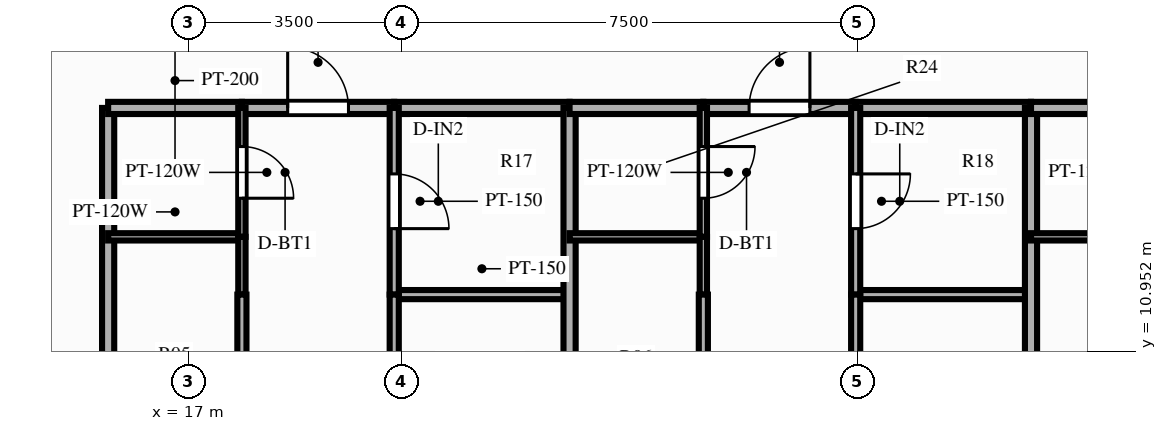
"""IFC4 building model, lengths in metres.
Left out: names, types, materials, properties, quantities, classifications, styles, units other than length and angle.
Written with IfcOpenShell. Run it as: python <this file> out.ifc"""

import sys

from ifc_helpers import new_model, si_unit, direction, frame, frame_2d, origin, place, context, subcontext, project, spatial, rectangle, extrude, source, transform, mapped, element, fill, save


model = new_model("IFC4")
c1 = context("Model", 3, precision=1e-05, world=origin(), true_north=direction((0.0, 1.0)))
c2 = subcontext(c1, "Body", "Model", "MODEL_VIEW")
j1 = project(units=[si_unit("LENGTHUNIT", "METRE"), si_unit("PLANEANGLEUNIT", "RADIAN")], contexts=[c1])
p1 = place(None, origin())
s1 = spatial("IfcSite", under=j1, at=p1, CompositionType="ELEMENT")
p2 = place(p1, origin())
s2 = spatial("IfcBuilding", under=s1, at=p2, CompositionType="ELEMENT")
p3 = place(p2, frame((0.0, 0.0, 22.4)))
s3 = spatial("IfcBuildingStorey", under=s2, at=p3, CompositionType="ELEMENT", Elevation=22.4)
p4 = place(p3, frame((15.68, 14.95, 0.0), z_axis=(0.0, 0.0, 1.0), x_axis=(0.0, -1.0, 0.0)))
e1 = element("IfcWall", 1, at=p4, inside=s3, PredefinedType="PARTITIONING", context=c2, shape_type="SweptSolid", body=[
    extrude(rectangle(XDim=11.8, YDim=0.2, at=frame_2d((5.9, 0.0))), origin(), (0.0, 0.0, 1.0), 2.79),
])
p5 = place(p3, frame((15.68, 14.95, 0.0), z_axis=(0.0, 0.0, 1.0), x_axis=(1.0, 0.0, 0.0)))
e2 = element("IfcWall", 2, at=p5, inside=s3, PredefinedType="PARTITIONING", context=c2, shape_type="SweptSolid", body=[
    extrude(rectangle(XDim=2.2, YDim=0.2, at=frame_2d((1.1, 0.0))), origin(), (0.0, 0.0, 1.0), 2.79),
])
p6 = place(p3, frame((17.88, 14.95, 0.0), z_axis=(0.0, 0.0, 1.0), x_axis=(1.0, 0.0, 0.0)))
e3 = element("IfcWall", 3, at=p6, inside=s3, PredefinedType="PARTITIONING", context=c2, shape_type="SweptSolid", body=[
    extrude(rectangle(XDim=2.505, YDim=0.2, at=frame_2d((1.252, 0.0))), origin(), (0.0, 0.0, 1.0), 2.79),
])
p7 = place(p6, frame((0.753, 0.0, 0.0)))
e4 = element("IfcOpeningElement", 4, at=p7, cuts=e3, PredefinedType="OPENING", context=c2, shape_type="SweptSolid", body=[
    extrude(rectangle(XDim=1.0, YDim=2.15, at=frame_2d((0.5, 1.075))), frame((0.0, 0.112, 0.0), z_axis=(0.0, -1.0, 0.0), x_axis=(1.0, 0.0, 0.0)), (0.0, 0.0, 1.0), 0.224),
])
p8 = place(p3, frame((20.385, 14.95, 0.0), z_axis=(0.0, 0.0, 1.0), x_axis=(1.0, 0.0, 0.0)))
e5 = element("IfcWall", 5, at=p8, inside=s3, PredefinedType="PARTITIONING", context=c2, shape_type="SweptSolid", body=[
    extrude(rectangle(XDim=2.884, YDim=0.2, at=frame_2d((1.442, 0.0))), origin(), (0.0, 0.0, 1.0), 2.79),
])
p9 = place(p3, frame((15.68, 12.83, 0.0), z_axis=(0.0, 0.0, 1.0), x_axis=(1.0, 0.0, 0.0)))
e6 = element("IfcWall", 6, at=p9, inside=s3, PredefinedType="PARTITIONING", context=c2, shape_type="SweptSolid", body=[
    extrude(rectangle(XDim=2.2, YDim=0.12, at=frame_2d((1.1, 0.0))), origin(), (0.0, 0.0, 1.0), 2.79),
])
p10 = place(p3, frame((20.385, 11.88, 0.0), z_axis=(0.0, 0.0, 1.0), x_axis=(1.0, 0.0, 0.0)))
e7 = element("IfcWall", 7, at=p10, inside=s3, PredefinedType="PARTITIONING", context=c2, shape_type="SweptSolid", body=[
    extrude(rectangle(XDim=2.884, YDim=0.15, at=frame_2d((1.442, 0.0))), origin(), (0.0, 0.0, 1.0), 2.79),
])
p11 = place(p3, frame((17.88, 14.95, 0.0), z_axis=(0.0, 0.0, 1.0), x_axis=(0.0, -1.0, 0.0)))
e8 = element("IfcWall", 8, at=p11, inside=s3, PredefinedType="PARTITIONING", context=c2, shape_type="SweptSolid", body=[
    extrude(rectangle(XDim=2.12, YDim=0.12, at=frame_2d((1.06, 0.0))), origin(), (0.0, 0.0, 1.0), 2.79),
])
p12 = place(p11, frame((0.635, 0.0, 0.0)))
e9 = element("IfcOpeningElement", 9, at=p12, cuts=e8, PredefinedType="OPENING", context=c2, shape_type="SweptSolid", body=[
    extrude(rectangle(XDim=0.85, YDim=2.05, at=frame_2d((0.425, 1.025))), frame((0.0, 0.072, 0.0), z_axis=(0.0, -1.0, 0.0), x_axis=(1.0, 0.0, 0.0)), (0.0, 0.0, 1.0), 0.144),
])
p13 = place(p3, frame((17.88, 12.83, 0.0), z_axis=(0.0, 0.0, 1.0), x_axis=(0.0, -1.0, 0.0)))
e10 = element("IfcWall", 10, at=p13, inside=s3, PredefinedType="PARTITIONING", context=c2, shape_type="SweptSolid", body=[
    extrude(rectangle(XDim=0.95, YDim=0.12, at=frame_2d((0.475, 0.0))), origin(), (0.0, 0.0, 1.0), 2.79),
])
p14 = place(p3, frame((17.88, 11.88, 0.0), z_axis=(0.0, 0.0, 1.0), x_axis=(0.0, -1.0, 0.0)))
e11 = element("IfcWall", 11, at=p14, inside=s3, PredefinedType="PARTITIONING", context=c2, shape_type="SweptSolid", body=[
    extrude(rectangle(XDim=8.73, YDim=0.15, at=frame_2d((4.365, 0.0))), origin(), (0.0, 0.0, 1.0), 2.79),
])
p15 = place(p14, frame((3.609, 0.0, 0.0)))
e12 = element("IfcOpeningElement", 12, at=p15, cuts=e11, PredefinedType="OPENING", context=c2, shape_type="SweptSolid", body=[
    extrude(rectangle(XDim=0.9, YDim=2.1, at=frame_2d((0.45, 1.05))), frame((0.0, 0.087, 0.0), z_axis=(0.0, -1.0, 0.0), x_axis=(1.0, 0.0, 0.0)), (0.0, 0.0, 1.0), 0.174),
])
p16 = place(p3, frame((20.385, 14.95, 0.0), z_axis=(0.0, 0.0, 1.0), x_axis=(0.0, -1.0, 0.0)))
e13 = element("IfcWall", 13, at=p16, inside=s3, PredefinedType="PARTITIONING", context=c2, shape_type="SweptSolid", body=[
    extrude(rectangle(XDim=3.07, YDim=0.15, at=frame_2d((1.535, 0.0))), origin(), (0.0, 0.0, 1.0), 2.79),
])
p17 = place(p16, frame((1.085, 0.0, 0.0)))
e14 = element("IfcOpeningElement", 14, at=p17, cuts=e13, PredefinedType="OPENING", context=c2, shape_type="SweptSolid", body=[
    extrude(rectangle(XDim=0.9, YDim=2.1, at=frame_2d((0.45, 1.05))), frame((0.0, 0.087, 0.0), z_axis=(0.0, -1.0, 0.0), x_axis=(1.0, 0.0, 0.0)), (0.0, 0.0, 1.0), 0.174),
])
p18 = place(p3, frame((20.385, 11.88, 0.0), z_axis=(0.0, 0.0, 1.0), x_axis=(0.0, -1.0, 0.0)))
e15 = element("IfcWall", 15, at=p18, inside=s3, PredefinedType="PARTITIONING", context=c2, shape_type="SweptSolid", body=[
    extrude(rectangle(XDim=8.73, YDim=0.15, at=frame_2d((4.365, 0.0))), origin(), (0.0, 0.0, 1.0), 2.79),
])
p19 = place(p18, frame((3.609, 0.0, 0.0)))
e16 = element("IfcOpeningElement", 16, at=p19, cuts=e15, PredefinedType="OPENING", context=c2, shape_type="SweptSolid", body=[
    extrude(rectangle(XDim=0.9, YDim=2.1, at=frame_2d((0.45, 1.05))), frame((0.0, 0.087, 0.0), z_axis=(0.0, -1.0, 0.0), x_axis=(1.0, 0.0, 0.0)), (0.0, 0.0, 1.0), 0.174),
])
p20 = place(p3, frame((23.269, 14.95, 0.0), z_axis=(0.0, 0.0, 1.0), x_axis=(0.0, -1.0, 0.0)))
e17 = element("IfcWall", 17, at=p20, inside=s3, PredefinedType="PARTITIONING", context=c2, shape_type="SweptSolid", body=[
    extrude(rectangle(XDim=11.8, YDim=0.2, at=frame_2d((5.9, 0.0))), origin(), (0.0, 0.0, 1.0), 2.79),
])
p21 = place(p3, frame((23.269, 14.95, 0.0), z_axis=(0.0, 0.0, 1.0), x_axis=(1.0, 0.0, 0.0)))
e18 = element("IfcWall", 18, at=p21, inside=s3, PredefinedType="PARTITIONING", context=c2, shape_type="SweptSolid", body=[
    extrude(rectangle(XDim=2.2, YDim=0.2, at=frame_2d((1.1, 0.0))), origin(), (0.0, 0.0, 1.0), 2.79),
])
p22 = place(p3, frame((25.469, 14.95, 0.0), z_axis=(0.0, 0.0, 1.0), x_axis=(1.0, 0.0, 0.0)))
e19 = element("IfcWall", 19, at=p22, inside=s3, PredefinedType="PARTITIONING", context=c2, shape_type="SweptSolid", body=[
    extrude(rectangle(XDim=2.505, YDim=0.2, at=frame_2d((1.252, 0.0))), origin(), (0.0, 0.0, 1.0), 2.79),
])
p23 = place(p22, frame((0.752, 0.0, 0.0)))
e20 = element("IfcOpeningElement", 20, at=p23, cuts=e19, PredefinedType="OPENING", context=c2, shape_type="SweptSolid", body=[
    extrude(rectangle(XDim=1.0, YDim=2.15, at=frame_2d((0.5, 1.075))), frame((0.0, 0.112, 0.0), z_axis=(0.0, -1.0, 0.0), x_axis=(1.0, 0.0, 0.0)), (0.0, 0.0, 1.0), 0.224),
])
p24 = place(p3, frame((27.974, 14.95, 0.0), z_axis=(0.0, 0.0, 1.0), x_axis=(1.0, 0.0, 0.0)))
e21 = element("IfcWall", 21, at=p24, inside=s3, PredefinedType="PARTITIONING", context=c2, shape_type="SweptSolid", body=[
    extrude(rectangle(XDim=2.884, YDim=0.2, at=frame_2d((1.442, 0.0))), origin(), (0.0, 0.0, 1.0), 2.79),
])
p25 = place(p3, frame((23.269, 12.83, 0.0), z_axis=(0.0, 0.0, 1.0), x_axis=(1.0, 0.0, 0.0)))
e22 = element("IfcWall", 22, at=p25, inside=s3, PredefinedType="PARTITIONING", context=c2, shape_type="SweptSolid", body=[
    extrude(rectangle(XDim=2.2, YDim=0.12, at=frame_2d((1.1, 0.0))), origin(), (0.0, 0.0, 1.0), 2.79),
])
p26 = place(p3, frame((27.974, 11.88, 0.0), z_axis=(0.0, 0.0, 1.0), x_axis=(1.0, 0.0, 0.0)))
e23 = element("IfcWall", 23, at=p26, inside=s3, PredefinedType="PARTITIONING", context=c2, shape_type="SweptSolid", body=[
    extrude(rectangle(XDim=2.884, YDim=0.15, at=frame_2d((1.442, 0.0))), origin(), (0.0, 0.0, 1.0), 2.79),
])
p27 = place(p3, frame((25.469, 14.95, 0.0), z_axis=(0.0, 0.0, 1.0), x_axis=(0.0, -1.0, 0.0)))
e24 = element("IfcWall", 24, at=p27, inside=s3, PredefinedType="PARTITIONING", context=c2, shape_type="SweptSolid", body=[
    extrude(rectangle(XDim=2.12, YDim=0.12, at=frame_2d((1.06, 0.0))), origin(), (0.0, 0.0, 1.0), 2.79),
])
p28 = place(p27, frame((0.635, 0.0, 0.0)))
e25 = element("IfcOpeningElement", 25, at=p28, cuts=e24, PredefinedType="OPENING", context=c2, shape_type="SweptSolid", body=[
    extrude(rectangle(XDim=0.85, YDim=2.05, at=frame_2d((0.425, 1.025))), frame((0.0, 0.072, 0.0), z_axis=(0.0, -1.0, 0.0), x_axis=(1.0, 0.0, 0.0)), (0.0, 0.0, 1.0), 0.144),
])
p29 = place(p3, frame((25.469, 12.83, 0.0), z_axis=(0.0, 0.0, 1.0), x_axis=(0.0, -1.0, 0.0)))
e26 = element("IfcWall", 26, at=p29, inside=s3, PredefinedType="PARTITIONING", context=c2, shape_type="SweptSolid", body=[
    extrude(rectangle(XDim=0.95, YDim=0.12, at=frame_2d((0.475, 0.0))), origin(), (0.0, 0.0, 1.0), 2.79),
])
p30 = place(p3, frame((25.469, 11.88, 0.0), z_axis=(0.0, 0.0, 1.0), x_axis=(0.0, -1.0, 0.0)))
e27 = element("IfcWall", 27, at=p30, inside=s3, PredefinedType="PARTITIONING", context=c2, shape_type="SweptSolid", body=[
    extrude(rectangle(XDim=8.73, YDim=0.15, at=frame_2d((4.365, 0.0))), origin(), (0.0, 0.0, 1.0), 2.79),
])
p31 = place(p30, frame((3.609, 0.0, 0.0)))
e28 = element("IfcOpeningElement", 28, at=p31, cuts=e27, PredefinedType="OPENING", context=c2, shape_type="SweptSolid", body=[
    extrude(rectangle(XDim=0.9, YDim=2.1, at=frame_2d((0.45, 1.05))), frame((0.0, 0.087, 0.0), z_axis=(0.0, -1.0, 0.0), x_axis=(1.0, 0.0, 0.0)), (0.0, 0.0, 1.0), 0.174),
])
p32 = place(p3, frame((27.974, 14.95, 0.0), z_axis=(0.0, 0.0, 1.0), x_axis=(0.0, -1.0, 0.0)))
e29 = element("IfcWall", 29, at=p32, inside=s3, PredefinedType="PARTITIONING", context=c2, shape_type="SweptSolid", body=[
    extrude(rectangle(XDim=3.07, YDim=0.15, at=frame_2d((1.535, 0.0))), origin(), (0.0, 0.0, 1.0), 2.79),
])
p33 = place(p32, frame((1.085, 0.0, 0.0)))
e30 = element("IfcOpeningElement", 30, at=p33, cuts=e29, PredefinedType="OPENING", context=c2, shape_type="SweptSolid", body=[
    extrude(rectangle(XDim=0.9, YDim=2.1, at=frame_2d((0.45, 1.05))), frame((0.0, 0.087, 0.0), z_axis=(0.0, -1.0, 0.0), x_axis=(1.0, 0.0, 0.0)), (0.0, 0.0, 1.0), 0.174),
])
p34 = place(p3, frame((27.974, 11.88, 0.0), z_axis=(0.0, 0.0, 1.0), x_axis=(0.0, -1.0, 0.0)))
e31 = element("IfcWall", 31, at=p34, inside=s3, PredefinedType="PARTITIONING", context=c2, shape_type="SweptSolid", body=[
    extrude(rectangle(XDim=8.73, YDim=0.15, at=frame_2d((4.365, 0.0))), origin(), (0.0, 0.0, 1.0), 2.79),
])
p35 = place(p34, frame((3.609, 0.0, 0.0)))
e32 = element("IfcOpeningElement", 32, at=p35, cuts=e31, PredefinedType="OPENING", context=c2, shape_type="SweptSolid", body=[
    extrude(rectangle(XDim=0.9, YDim=2.1, at=frame_2d((0.45, 1.05))), frame((0.0, 0.087, 0.0), z_axis=(0.0, -1.0, 0.0), x_axis=(1.0, 0.0, 0.0)), (0.0, 0.0, 1.0), 0.174),
])
p36 = place(p3, frame((30.858, 14.95, 0.0), z_axis=(0.0, 0.0, 1.0), x_axis=(0.0, -1.0, 0.0)))
e33 = element("IfcWall", 33, at=p36, inside=s3, PredefinedType="PARTITIONING", context=c2, shape_type="SweptSolid", body=[
    extrude(rectangle(XDim=11.8, YDim=0.2, at=frame_2d((5.9, 0.0))), origin(), (0.0, 0.0, 1.0), 2.24),
])
p37 = place(p3, frame((30.858, 14.95, 0.0), z_axis=(0.0, 0.0, 1.0), x_axis=(1.0, 0.0, 0.0)))
e34 = element("IfcWall", 34, at=p37, inside=s3, PredefinedType="PARTITIONING", context=c2, shape_type="SweptSolid", body=[
    extrude(rectangle(XDim=2.2, YDim=0.2, at=frame_2d((1.1, 0.0))), origin(), (0.0, 0.0, 1.0), 2.79),
])
p38 = place(p3, frame((30.858, 12.83, 0.0), z_axis=(0.0, 0.0, 1.0), x_axis=(1.0, 0.0, 0.0)))
e35 = element("IfcWall", 35, at=p38, inside=s3, PredefinedType="PARTITIONING", context=c2, shape_type="SweptSolid", body=[
    extrude(rectangle(XDim=2.2, YDim=0.12, at=frame_2d((1.1, 0.0))), origin(), (0.0, 0.0, 1.0), 2.79),
])
m1 = source(origin(), c2, "Body", "SweptSolid", [
    extrude(rectangle(XDim=1.0, YDim=2.15, at=frame_2d((0.5, 1.075))), frame((0.0, 0.025, 0.0), z_axis=(0.0, -1.0, 0.0), x_axis=(1.0, 0.0, 0.0)), (0.0, 0.0, 1.0), 0.05),
])
p39 = place(p7, origin())
e36 = element("IfcDoor", 36, at=p39, inside=s3, OperationType="SINGLE_SWING_LEFT", PredefinedType="DOOR", context=c2, shape_type="MappedRepresentation", body=[
    mapped(m1, transform((0.0, 0.0, 0.0), scale=1.0)),
])
fill(e4, e36)
m2 = source(origin(), c2, "Body", "SweptSolid", [
    extrude(rectangle(XDim=0.85, YDim=2.05, at=frame_2d((0.425, 1.025))), frame((0.0, 0.025, 0.0), z_axis=(0.0, -1.0, 0.0), x_axis=(1.0, 0.0, 0.0)), (0.0, 0.0, 1.0), 0.05),
])
p40 = place(p12, origin())
e37 = element("IfcDoor", 37, at=p40, inside=s3, OperationType="SINGLE_SWING_RIGHT", PredefinedType="DOOR", context=c2, shape_type="MappedRepresentation", body=[
    mapped(m2, transform((0.0, 0.0, 0.0), scale=1.0)),
])
fill(e9, e37)
m3 = source(origin(), c2, "Body", "SweptSolid", [
    extrude(rectangle(XDim=0.9, YDim=2.1, at=frame_2d((0.45, 1.05))), frame((0.0, 0.025, 0.0), z_axis=(0.0, -1.0, 0.0), x_axis=(1.0, 0.0, 0.0)), (0.0, 0.0, 1.0), 0.05),
])
p41 = place(p17, origin())
e38 = element("IfcDoor", 38, at=p41, inside=s3, OperationType="SINGLE_SWING_RIGHT", PredefinedType="DOOR", context=c2, shape_type="MappedRepresentation", body=[
    mapped(m3, transform((0.0, 0.0, 0.0), scale=1.0)),
])
fill(e14, e38)
p42 = place(p23, origin())
e39 = element("IfcDoor", 39, at=p42, inside=s3, OperationType="SINGLE_SWING_RIGHT", PredefinedType="DOOR", context=c2, shape_type="MappedRepresentation", body=[
    mapped(m1, transform((0.0, 0.0, 0.0), scale=1.0)),
])
fill(e20, e39)
p43 = place(p28, origin())
e40 = element("IfcDoor", 40, at=p43, inside=s3, OperationType="SINGLE_SWING_LEFT", PredefinedType="DOOR", context=c2, shape_type="MappedRepresentation", body=[
    mapped(m2, transform((0.0, 0.0, 0.0), scale=1.0)),
])
fill(e25, e40)
p44 = place(p33, origin())
e41 = element("IfcDoor", 41, at=p44, inside=s3, OperationType="SINGLE_SWING_LEFT", PredefinedType="DOOR", context=c2, shape_type="MappedRepresentation", body=[
    mapped(m3, transform((0.0, 0.0, 0.0), scale=1.0)),
])
fill(e30, e41)
save(model, sys.argv[1])
